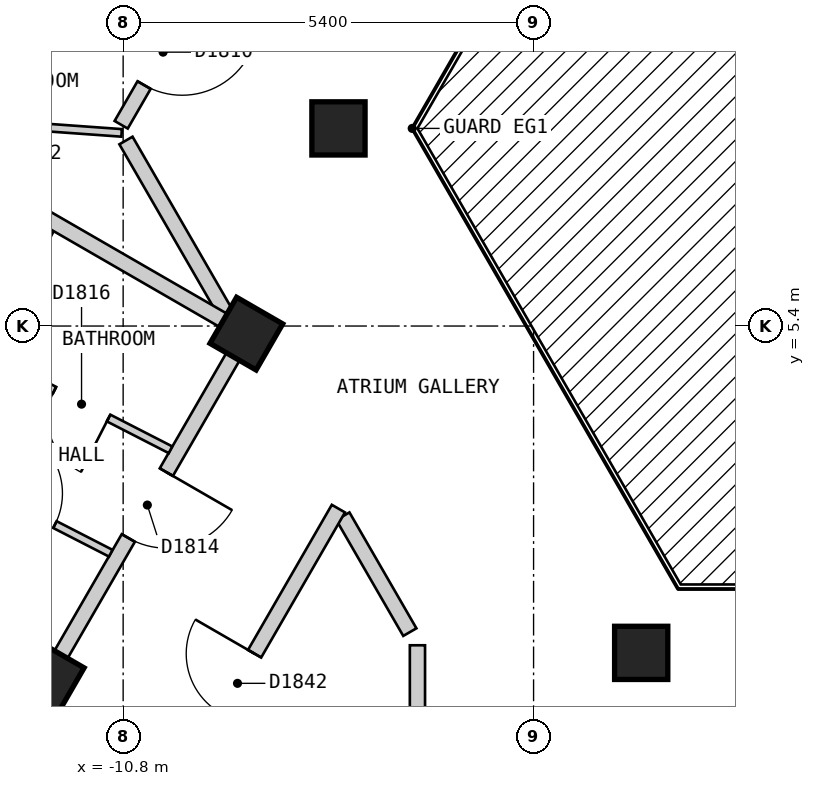
"""IFC4 building model, lengths in metres.
Left out: names, types, materials, properties, quantities, classifications, styles, units other than length and angle.
Written with IfcOpenShell. Run it as: python <this file> out.ifc"""

import sys

from ifc_helpers import new_model, si_unit, direction, frame, frame_2d, origin, origin_2d, place, context, subcontext, project, spatial, rectangle, extrude, element, fill, save


model = new_model("IFC4")
c1 = context("Model", 3, precision=1e-05, world=origin(), true_north=direction((0.0, 1.0)))
c2 = subcontext(c1, "Body", "Model", "MODEL_VIEW")
j1 = project(units=[si_unit("LENGTHUNIT", "METRE"), si_unit("PLANEANGLEUNIT", "RADIAN")], contexts=[c1])
p1 = place(None, origin())
s1 = spatial("IfcSite", under=j1, at=p1, CompositionType="ELEMENT")
p2 = place(p1, origin())
s2 = spatial("IfcBuilding", under=s1, at=p2, CompositionType="ELEMENT")
p3 = place(p2, frame((0.0, 0.0, 208.8)))
s3 = spatial("IfcBuildingStorey", under=s2, at=p3, CompositionType="ELEMENT", Elevation=208.8)
for number, where, z_axis, x_axis in (
    (1, (-7.967, 8.0, 0.0), (0.0, 0.0, 1.0), (1.0, 0.0, 0.0)),
    (2, (-9.179, 5.3, 0.0), (0.0, 0.0, 1.0), (-0.5, -0.866, 0.0)),
    (3, (-3.984, 1.1, 0.0), (0.0, 0.0, 1.0), (1.0, 0.0, 0.0)),
    (4, (-11.792, 0.775, 0.0), (0.0, 0.0, 1.0), (-0.5, -0.866, 0.0)),
):
    element("IfcColumn", number, at=place(p3, frame(where, z_axis=z_axis, x_axis=x_axis)), inside=s3, PredefinedType="COLUMN", context=c2, shape_type="SweptSolid", body=[
        extrude(rectangle(XDim=0.7, YDim=0.7, at=origin_2d()), origin(), (0.0, 0.0, 1.0), 3.0),
    ])
p4 = place(p3, frame((-10.763, 7.841, 0.0), z_axis=(0.0, 0.0, 1.0), x_axis=(0.499980792466, -0.866036492975, 0.0)))
e5 = element("IfcWall", 5, at=p4, inside=s3, PredefinedType="PARTITIONING", context=c2, shape_type="SweptSolid", body=[
    extrude(rectangle(XDim=2.618, YDim=0.2, at=frame_2d((1.309, 0.0))), origin(), (0.0, 0.0, 1.0), 2.7),
])
p5 = place(p3, frame((-7.909, 2.898, 0.0), z_axis=(0.0, 0.0, 1.0), x_axis=(0.50019444547, -0.865913111531, 0.0)))
e6 = element("IfcWall", 6, at=p5, inside=s3, PredefinedType="PARTITIONING", context=c2, shape_type="SweptSolid", body=[
    extrude(rectangle(XDim=1.761, YDim=0.2, at=frame_2d((0.88, 0.0))), origin(), (0.0, 0.0, 1.0), 2.7),
])
p6 = place(p3, frame((-10.623, -1.6, 0.0), z_axis=(0.0, 0.0, 1.0), x_axis=(0.500040865889, 0.866001808567, 0.0)))
e7 = element("IfcWall", 7, at=p6, inside=s3, PredefinedType="PARTITIONING", context=c2, shape_type="SweptSolid", body=[
    extrude(rectangle(XDim=5.31, YDim=0.2, at=frame_2d((2.655, 0.0))), origin(), (0.0, 0.0, 1.0), 2.7),
])
p7 = place(p6, frame((2.205, 0.0, 0.0)))
e8 = element("IfcOpeningElement", 8, at=p7, cuts=e7, PredefinedType="OPENING", context=c2, shape_type="SweptSolid", body=[
    extrude(rectangle(XDim=0.9, YDim=2.1, at=frame_2d((0.45, 1.05))), frame((0.0, 0.11, 0.0), z_axis=(0.0, -1.0, 0.0), x_axis=(1.0, 0.0, 0.0)), (0.0, 0.0, 1.0), 0.22),
])
p8 = place(p3, frame((-13.106, -1.5, 0.0), z_axis=(0.0, 0.0, 1.0), x_axis=(0.500025705601, 0.86601056214, 0.0)))
e9 = element("IfcWall", 9, at=p8, inside=s3, PredefinedType="PARTITIONING", context=c2, shape_type="SweptSolid", body=[
    extrude(rectangle(XDim=7.735, YDim=0.2, at=frame_2d((3.868, 0.0))), origin(), (0.0, 0.0, 1.0), 2.7),
])
p9 = place(p8, frame((4.748, 0.0, 0.0)))
e10 = element("IfcOpeningElement", 10, at=p9, cuts=e9, PredefinedType="OPENING", context=c2, shape_type="SweptSolid", body=[
    extrude(rectangle(XDim=1.0, YDim=2.1, at=frame_2d((0.5, 1.05))), frame((0.0, 0.11, 0.0), z_axis=(0.0, -1.0, 0.0), x_axis=(1.0, 0.0, 0.0)), (0.0, 0.0, 1.0), 0.22),
])
p10 = place(p8, frame((0.03, 0.0, 0.0)))
e11 = element("IfcOpeningElement", 11, at=p10, cuts=e9, PredefinedType="OPENING", context=c2, shape_type="SweptSolid", body=[
    extrude(rectangle(XDim=0.8, YDim=2.1, at=frame_2d((0.4, 1.05))), frame((0.0, 0.11, 0.0), z_axis=(0.0, -1.0, 0.0), x_axis=(1.0, 0.0, 0.0)), (0.0, 0.0, 1.0), 0.22),
])
p11 = place(p3, frame((-10.826, 8.048, 0.0), z_axis=(0.0, 0.0, 1.0), x_axis=(0.499953104851, 0.866052477019, 0.0)))
e12 = element("IfcWall", 12, at=p11, inside=s3, PredefinedType="PARTITIONING", context=c2, shape_type="SweptSolid", body=[
    extrude(rectangle(XDim=7.91, YDim=0.2, at=frame_2d((3.955, 0.0))), origin(), (0.0, 0.0, 1.0), 2.7),
])
p12 = place(p11, frame((0.603, 0.0, 0.0)))
e13 = element("IfcOpeningElement", 13, at=p12, cuts=e12, PredefinedType="OPENING", context=c2, shape_type="SweptSolid", body=[
    extrude(rectangle(XDim=1.0, YDim=2.1, at=frame_2d((0.5, 1.05))), frame((0.0, 0.11, 0.0), z_axis=(0.0, -1.0, 0.0), x_axis=(1.0, 0.0, 0.0)), (0.0, 0.0, 1.0), 0.22),
])
p13 = place(p3, frame((-6.928, -2.799, 0.0), z_axis=(0.0, 0.0, 1.0), x_axis=(0.0, 1.0, 0.0)))
e14 = element("IfcWall", 14, at=p13, inside=s3, PredefinedType="PARTITIONING", context=c2, shape_type="SweptSolid", body=[
    extrude(rectangle(XDim=3.999, YDim=0.2, at=frame_2d((2.0, 0.0))), origin(), (0.0, 0.0, 1.0), 2.7),
])
p14 = place(p3, frame((-12.562, 4.995, 0.0), z_axis=(0.0, 0.0, 1.0), x_axis=(0.889807979554, -0.456335139478, 0.0)))
e15 = element("IfcWall", 15, at=p14, inside=s3, PredefinedType="PARTITIONING", context=c2, shape_type="SweptSolid", body=[
    extrude(rectangle(XDim=2.68, YDim=0.1, at=frame_2d((1.34, 0.0))), origin(), (0.0, 0.0, 1.0), 2.7),
])
p15 = place(p14, frame((0.965, 0.0, 0.0)))
e16 = element("IfcOpeningElement", 16, at=p15, cuts=e15, PredefinedType="OPENING", context=c2, shape_type="SweptSolid", body=[
    extrude(rectangle(XDim=0.8, YDim=2.1, at=frame_2d((0.4, 1.05))), frame((0.0, 0.06, 0.0), z_axis=(0.0, -1.0, 0.0), x_axis=(1.0, 0.0, 0.0)), (0.0, 0.0, 1.0), 0.12),
])
p16 = place(p3, frame((-13.277, 3.598, 0.0), z_axis=(0.0, 0.0, 1.0), x_axis=(0.889780322893, -0.456389063182, 0.0)))
e17 = element("IfcWall", 17, at=p16, inside=s3, PredefinedType="PARTITIONING", context=c2, shape_type="SweptSolid", body=[
    extrude(rectangle(XDim=2.601, YDim=0.1, at=frame_2d((1.3, 0.0))), origin(), (0.0, 0.0, 1.0), 2.7),
])
p17 = place(p16, frame((0.875, 0.0, 0.0)))
e18 = element("IfcOpeningElement", 18, at=p17, cuts=e17, PredefinedType="OPENING", context=c2, shape_type="SweptSolid", body=[
    extrude(rectangle(XDim=0.9, YDim=2.1, at=frame_2d((0.45, 1.05))), frame((0.0, 0.06, 0.0), z_axis=(0.0, -1.0, 0.0), x_axis=(1.0, 0.0, 0.0)), (0.0, 0.0, 1.0), 0.12),
])
p18 = place(p3, frame((-13.866, 8.159, 0.0), z_axis=(0.0, 0.0, 1.0), x_axis=(0.9974481372, -0.071394772886, 0.0)))
e19 = element("IfcWall", 19, at=p18, inside=s3, PredefinedType="PARTITIONING", context=c2, shape_type="SweptSolid", body=[
    extrude(rectangle(XDim=3.054, YDim=0.1, at=frame_2d((1.527, 0.0))), origin(), (0.0, 0.0, 1.0), 2.7),
])
p19 = place(p18, frame((1.099, 0.0, 0.0)))
e20 = element("IfcOpeningElement", 20, at=p19, cuts=e19, PredefinedType="OPENING", context=c2, shape_type="SweptSolid", body=[
    extrude(rectangle(XDim=0.8, YDim=2.1, at=frame_2d((0.4, 1.05))), frame((0.0, 0.06, 0.0), z_axis=(0.0, -1.0, 0.0), x_axis=(1.0, 0.0, 0.0)), (0.0, 0.0, 1.0), 0.12),
])
p20 = place(p3, frame((-13.322, 3.622, 0.0), z_axis=(0.0, 0.0, 1.0), x_axis=(0.456157649007, 0.889898982611, 0.0)))
e21 = element("IfcWall", 21, at=p20, inside=s3, PredefinedType="PARTITIONING", context=c2, shape_type="SweptSolid", body=[
    extrude(rectangle(XDim=3.398, YDim=0.1, at=frame_2d((1.699, 0.0))), origin(), (0.0, 0.0, 1.0), 2.7),
])
p21 = place(p3, frame((-17.926, 10.35, 0.0), z_axis=(0.0, 0.0, 1.0), x_axis=(0.866018411306, -0.500012111133, 0.0)))
e22 = element("IfcWall", 22, at=p21, inside=s3, PredefinedType="PARTITIONING", context=c2, shape_type="SweptSolid", body=[
    extrude(rectangle(XDim=9.898, YDim=0.2, at=frame_2d((4.949, 0.0))), origin(), (0.0, 0.0, 1.0), 2.7),
])
p22 = place(p12, origin())
e23 = element("IfcDoor", 23, at=p22, inside=s3, OperationType="SINGLE_SWING_RIGHT", PredefinedType="DOOR", context=c2, shape_type="SweptSolid", body=[
    extrude(rectangle(XDim=1.0, YDim=2.1, at=frame_2d((0.5, 1.05))), frame((0.0, 0.025, 0.0), z_axis=(0.0, -1.0, 0.0), x_axis=(1.0, 0.0, 0.0)), (0.0, 0.0, 1.0), 0.05),
])
fill(e13, e23)
p23 = place(p9, origin())
e24 = element("IfcDoor", 24, at=p23, inside=s3, OperationType="SINGLE_SWING_RIGHT", PredefinedType="DOOR", context=c2, shape_type="SweptSolid", body=[
    extrude(rectangle(XDim=1.0, YDim=2.1, at=frame_2d((0.5, 1.05))), frame((0.0, 0.025, 0.0), z_axis=(0.0, -1.0, 0.0), x_axis=(1.0, 0.0, 0.0)), (0.0, 0.0, 1.0), 0.05),
])
fill(e10, e24)
p24 = place(p17, origin())
e25 = element("IfcDoor", 25, at=p24, inside=s3, OperationType="SINGLE_SWING_LEFT", PredefinedType="DOOR", context=c2, shape_type="SweptSolid", body=[
    extrude(rectangle(XDim=0.9, YDim=2.1, at=frame_2d((0.45, 1.05))), frame((0.0, 0.025, 0.0), z_axis=(0.0, -1.0, 0.0), x_axis=(1.0, 0.0, 0.0)), (0.0, 0.0, 1.0), 0.05),
])
fill(e18, e25)
p25 = place(p15, origin())
e26 = element("IfcDoor", 26, at=p25, inside=s3, OperationType="SINGLE_SWING_RIGHT", PredefinedType="DOOR", context=c2, shape_type="SweptSolid", body=[
    extrude(rectangle(XDim=0.8, YDim=2.1, at=frame_2d((0.4, 1.05))), frame((0.0, 0.025, 0.0), z_axis=(0.0, -1.0, 0.0), x_axis=(1.0, 0.0, 0.0)), (0.0, 0.0, 1.0), 0.05),
])
fill(e16, e26)
p26 = place(p7, origin())
e27 = element("IfcDoor", 27, at=p26, inside=s3, OperationType="SINGLE_SWING_RIGHT", PredefinedType="DOOR", context=c2, shape_type="SweptSolid", body=[
    extrude(rectangle(XDim=0.9, YDim=2.1, at=frame_2d((0.45, 1.05))), frame((0.0, 0.025, 0.0), z_axis=(0.0, -1.0, 0.0), x_axis=(1.0, 0.0, 0.0)), (0.0, 0.0, 1.0), 0.05),
])
fill(e8, e27)
save(model, sys.argv[1])
